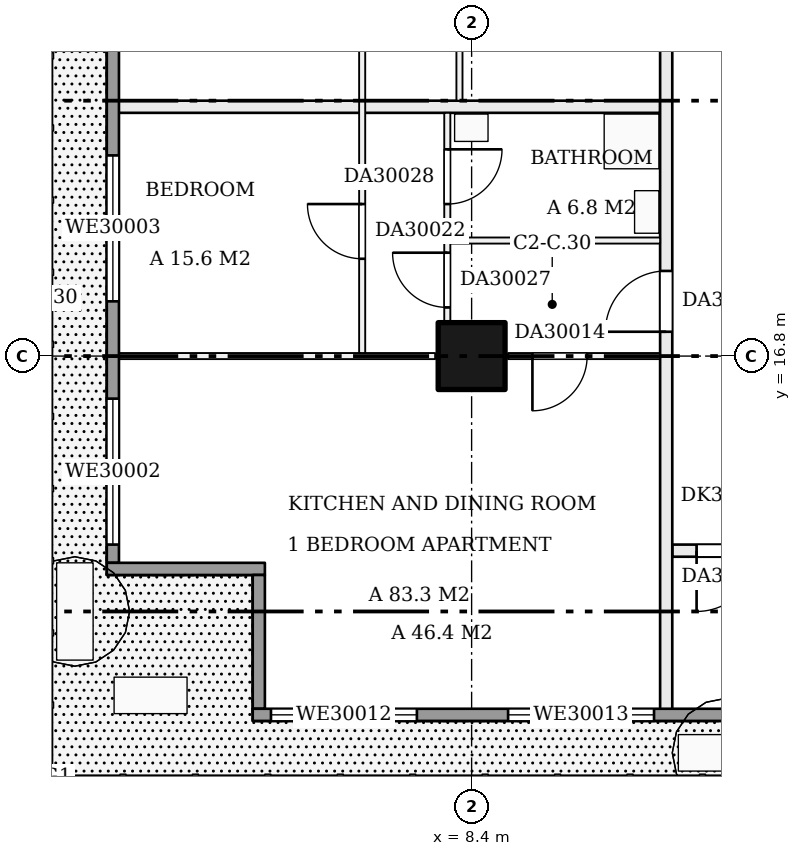
"""IFC4 building model, lengths in metres.
Left out: names, types, materials, properties, quantities, classifications, styles, units other than length and angle.
Written with IfcOpenShell. Run it as: python <this file> out.ifc"""

import sys

from ifc_helpers import new_model, si_unit, direction, frame, frame_2d, origin, origin_2d, place, context, subcontext, project, spatial, rectangle, extrude, element, fill, save


model = new_model("IFC4")
c1 = context("Model", 3, precision=1e-05, world=origin(), true_north=direction((0.0, 1.0)))
c2 = subcontext(c1, "Body", "Model", "MODEL_VIEW")
j1 = project(units=[si_unit("LENGTHUNIT", "METRE"), si_unit("PLANEANGLEUNIT", "RADIAN")], contexts=[c1])
p1 = place(None, origin())
s1 = spatial("IfcSite", under=j1, at=p1, CompositionType="ELEMENT")
p2 = place(p1, origin())
s2 = spatial("IfcBuilding", under=s1, at=p2, CompositionType="ELEMENT")
p3 = place(p2, frame((0.0, 0.0, 119.7)))
s3 = spatial("IfcBuildingStorey", under=s2, at=p3, CompositionType="ELEMENT", Elevation=119.7)
p4 = place(p3, frame((8.4, 16.8, 0.0), z_axis=(0.0, 0.0, 1.0), x_axis=(1.0, 0.0, 0.0)))
e1 = element("IfcColumn", 1, at=p4, inside=s3, PredefinedType="COLUMN", context=c2, shape_type="SweptSolid", body=[
    extrude(rectangle(XDim=1.1, YDim=1.1, at=origin_2d()), origin(), (0.0, 0.0, 1.0), 3.22),
])
p5 = place(p3, frame((11.7, 13.6, 0.0), z_axis=(0.0, 0.0, 1.0), x_axis=(1.0, 0.0, 0.0)))
e2 = element("IfcWall", 2, at=p5, inside=s3, PredefinedType="PARTITIONING", context=c2, shape_type="SweptSolid", body=[
    extrude(rectangle(XDim=1.8, YDim=0.2, at=frame_2d((0.9, 0.0))), origin(), (0.0, 0.0, 1.0), 3.22),
])
p6 = place(p5, frame((0.4, 0.0, 0.0)))
e3 = element("IfcOpeningElement", 3, at=p6, cuts=e2, PredefinedType="OPENING", context=c2, shape_type="SweptSolid", body=[
    extrude(rectangle(XDim=1.0, YDim=2.1, at=frame_2d((0.5, 1.05))), frame((0.0, 0.11, 0.0), z_axis=(0.0, -1.0, 0.0), x_axis=(1.0, 0.0, 0.0)), (0.0, 0.0, 1.0), 0.22),
])
p7 = place(p3, frame((2.5, 16.8, 0.0), z_axis=(0.0, 0.0, 1.0), x_axis=(1.0, 0.0, 0.0)))
e4 = element("IfcWall", 4, at=p7, inside=s3, PredefinedType="PARTITIONING", context=c2, shape_type="SweptSolid", body=[
    extrude(rectangle(XDim=5.3, YDim=0.1, at=frame_2d((2.65, 0.0))), origin(), (0.0, 0.0, 1.0), 3.22),
])
p8 = place(p3, frame((9.0, 16.8, 0.0), z_axis=(0.0, 0.0, 1.0), x_axis=(1.0, 0.0, 0.0)))
e5 = element("IfcWall", 5, at=p8, inside=s3, PredefinedType="PARTITIONING", context=c2, shape_type="SweptSolid", body=[
    extrude(rectangle(XDim=2.5, YDim=0.1, at=frame_2d((1.25, 0.0))), origin(), (0.0, 0.0, 1.0), 3.22),
])
p9 = place(p8, frame((0.4, 0.0, 0.0)))
e6 = element("IfcOpeningElement", 6, at=p9, cuts=e5, PredefinedType="OPENING", context=c2, shape_type="SweptSolid", body=[
    extrude(rectangle(XDim=0.9, YDim=2.1, at=frame_2d((0.45, 1.05))), frame((0.0, 0.06, 0.0), z_axis=(0.0, -1.0, 0.0), x_axis=(1.0, 0.0, 0.0)), (0.0, 0.0, 1.0), 0.12),
])
p10 = place(p3, frame((8.05, 18.7, 0.0), z_axis=(0.0, 0.0, 1.0), x_axis=(1.0, 0.0, 0.0)))
e7 = element("IfcWall", 7, at=p10, inside=s3, PredefinedType="PARTITIONING", context=c2, shape_type="SweptSolid", body=[
    extrude(rectangle(XDim=3.45, YDim=0.1, at=frame_2d((1.725, 0.0))), origin(), (0.0, 0.0, 1.0), 3.22),
])
p11 = place(p3, frame((2.5, 20.9, 0.0), z_axis=(0.0, 0.0, 1.0), x_axis=(1.0, 0.0, 0.0)))
e8 = element("IfcWall", 8, at=p11, inside=s3, PredefinedType="PARTITIONING", context=c2, shape_type="SweptSolid", body=[
    extrude(rectangle(XDim=9.0, YDim=0.2, at=frame_2d((4.5, 0.0))), origin(), (0.0, 0.0, 1.0), 3.22),
])
p12 = place(p3, frame((6.6, 16.85, 0.0), z_axis=(0.0, 0.0, 1.0), x_axis=(0.0, 1.0, 0.0)))
e9 = element("IfcWall", 9, at=p12, inside=s3, PredefinedType="PARTITIONING", context=c2, shape_type="SweptSolid", body=[
    extrude(rectangle(XDim=25.05, YDim=0.1, at=frame_2d((12.525, 0.0))), origin(), (0.0, 0.0, 1.0), 3.22),
])
p13 = place(p12, frame((1.55, 0.0, 0.0)))
e10 = element("IfcOpeningElement", 10, at=p13, cuts=e9, PredefinedType="OPENING", context=c2, shape_type="SweptSolid", body=[
    extrude(rectangle(XDim=0.9, YDim=2.1, at=frame_2d((0.45, 1.05))), frame((0.0, 0.06, 0.0), z_axis=(0.0, -1.0, 0.0), x_axis=(1.0, 0.0, 0.0)), (0.0, 0.0, 1.0), 0.12),
])
p14 = place(p12, frame((7.15, 0.0, 0.0)))
e11 = element("IfcOpeningElement", 11, at=p14, cuts=e9, PredefinedType="OPENING", context=c2, shape_type="SweptSolid", body=[
    extrude(rectangle(XDim=0.9, YDim=2.1, at=frame_2d((0.45, 1.05))), frame((0.0, 0.06, 0.0), z_axis=(0.0, -1.0, 0.0), x_axis=(1.0, 0.0, 0.0)), (0.0, 0.0, 1.0), 0.12),
])
p15 = place(p12, frame((14.15, 0.0, 0.0)))
e12 = element("IfcOpeningElement", 12, at=p15, cuts=e9, PredefinedType="OPENING", context=c2, shape_type="SweptSolid", body=[
    extrude(rectangle(XDim=0.9, YDim=2.1, at=frame_2d((0.45, 1.05))), frame((0.0, 0.06, 0.0), z_axis=(0.0, -1.0, 0.0), x_axis=(1.0, 0.0, 0.0)), (0.0, 0.0, 1.0), 0.12),
])
p16 = place(p12, frame((18.35, 0.0, 0.0)))
e13 = element("IfcOpeningElement", 13, at=p16, cuts=e9, PredefinedType="OPENING", context=c2, shape_type="SweptSolid", body=[
    extrude(rectangle(XDim=0.9, YDim=2.1, at=frame_2d((0.45, 1.05))), frame((0.0, 0.06, 0.0), z_axis=(0.0, -1.0, 0.0), x_axis=(1.0, 0.0, 0.0)), (0.0, 0.0, 1.0), 0.12),
])
p17 = place(p12, frame((22.55, 0.0, 0.0)))
e14 = element("IfcOpeningElement", 14, at=p17, cuts=e9, PredefinedType="OPENING", context=c2, shape_type="SweptSolid", body=[
    extrude(rectangle(XDim=0.9, YDim=2.1, at=frame_2d((0.45, 1.05))), frame((0.0, 0.06, 0.0), z_axis=(0.0, -1.0, 0.0), x_axis=(1.0, 0.0, 0.0)), (0.0, 0.0, 1.0), 0.12),
])
p18 = place(p3, frame((8.0, 16.85, 0.0), z_axis=(0.0, 0.0, 1.0), x_axis=(0.0, 1.0, 0.0)))
e15 = element("IfcWall", 15, at=p18, inside=s3, PredefinedType="PARTITIONING", context=c2, shape_type="SweptSolid", body=[
    extrude(rectangle(XDim=3.95, YDim=0.1, at=frame_2d((1.975, 0.0))), origin(), (0.0, 0.0, 1.0), 3.22),
])
p19 = place(p18, frame((0.75, 0.0, 0.0)))
e16 = element("IfcOpeningElement", 16, at=p19, cuts=e15, PredefinedType="OPENING", context=c2, shape_type="SweptSolid", body=[
    extrude(rectangle(XDim=0.9, YDim=2.1, at=frame_2d((0.45, 1.05))), frame((0.0, 0.06, 0.0), z_axis=(0.0, -1.0, 0.0), x_axis=(1.0, 0.0, 0.0)), (0.0, 0.0, 1.0), 0.12),
])
p20 = place(p18, frame((2.45, 0.0, 0.0)))
e17 = element("IfcOpeningElement", 17, at=p20, cuts=e15, PredefinedType="OPENING", context=c2, shape_type="SweptSolid", body=[
    extrude(rectangle(XDim=0.9, YDim=2.1, at=frame_2d((0.45, 1.05))), frame((0.0, 0.06, 0.0), z_axis=(0.0, -1.0, 0.0), x_axis=(1.0, 0.0, 0.0)), (0.0, 0.0, 1.0), 0.12),
])
p21 = place(p3, frame((8.2, 21.0, 0.0), z_axis=(0.0, 0.0, 1.0), x_axis=(0.0, 1.0, 0.0)))
e18 = element("IfcWall", 18, at=p21, inside=s3, PredefinedType="PARTITIONING", context=c2, shape_type="SweptSolid", body=[
    extrude(rectangle(XDim=20.9, YDim=0.1, at=frame_2d((10.45, 0.0))), origin(), (0.0, 0.0, 1.0), 3.22),
])
p22 = place(p21, frame((1.0, 0.0, 0.0)))
e19 = element("IfcOpeningElement", 19, at=p22, cuts=e18, PredefinedType="OPENING", context=c2, shape_type="SweptSolid", body=[
    extrude(rectangle(XDim=0.9, YDim=2.1, at=frame_2d((0.45, 1.05))), frame((0.0, 0.06, 0.0), z_axis=(0.0, -1.0, 0.0), x_axis=(1.0, 0.0, 0.0)), (0.0, 0.0, 1.0), 0.12),
])
p23 = place(p21, frame((4.914, 0.0, 0.0)))
e20 = element("IfcOpeningElement", 20, at=p23, cuts=e18, PredefinedType="OPENING", context=c2, shape_type="SweptSolid", body=[
    extrude(rectangle(XDim=0.9, YDim=2.1, at=frame_2d((0.45, 1.05))), frame((0.0, 0.06, 0.0), z_axis=(0.0, -1.0, 0.0), x_axis=(1.0, 0.0, 0.0)), (0.0, 0.0, 1.0), 0.12),
])
p24 = place(p21, frame((7.329, 0.0, 0.0)))
e21 = element("IfcOpeningElement", 21, at=p24, cuts=e18, PredefinedType="OPENING", context=c2, shape_type="SweptSolid", body=[
    extrude(rectangle(XDim=0.9, YDim=2.1, at=frame_2d((0.45, 1.05))), frame((0.0, 0.06, 0.0), z_axis=(0.0, -1.0, 0.0), x_axis=(1.0, 0.0, 0.0)), (0.0, 0.0, 1.0), 0.12),
])
p25 = place(p21, frame((10.243, 0.0, 0.0)))
e22 = element("IfcOpeningElement", 22, at=p25, cuts=e18, PredefinedType="OPENING", context=c2, shape_type="SweptSolid", body=[
    extrude(rectangle(XDim=0.9, YDim=2.1, at=frame_2d((0.45, 1.05))), frame((0.0, 0.06, 0.0), z_axis=(0.0, -1.0, 0.0), x_axis=(1.0, 0.0, 0.0)), (0.0, 0.0, 1.0), 0.12),
])
p26 = place(p21, frame((13.357, 0.0, 0.0)))
e23 = element("IfcOpeningElement", 23, at=p26, cuts=e18, PredefinedType="OPENING", context=c2, shape_type="SweptSolid", body=[
    extrude(rectangle(XDim=0.9, YDim=2.1, at=frame_2d((0.45, 1.05))), frame((0.0, 0.06, 0.0), z_axis=(0.0, -1.0, 0.0), x_axis=(1.0, 0.0, 0.0)), (0.0, 0.0, 1.0), 0.12),
])
p27 = place(p21, frame((15.772, 0.0, 0.0)))
e24 = element("IfcOpeningElement", 24, at=p27, cuts=e18, PredefinedType="OPENING", context=c2, shape_type="SweptSolid", body=[
    extrude(rectangle(XDim=0.9, YDim=2.1, at=frame_2d((0.45, 1.05))), frame((0.0, 0.06, 0.0), z_axis=(0.0, -1.0, 0.0), x_axis=(1.0, 0.0, 0.0)), (0.0, 0.0, 1.0), 0.12),
])
p28 = place(p21, frame((18.986, 0.0, 0.0)))
e25 = element("IfcOpeningElement", 25, at=p28, cuts=e18, PredefinedType="OPENING", context=c2, shape_type="SweptSolid", body=[
    extrude(rectangle(XDim=0.9, YDim=2.1, at=frame_2d((0.45, 1.05))), frame((0.0, 0.06, 0.0), z_axis=(0.0, -1.0, 0.0), x_axis=(1.0, 0.0, 0.0)), (0.0, 0.0, 1.0), 0.12),
])
p29 = place(p3, frame((11.6, 10.9, 0.0), z_axis=(0.0, 0.0, 1.0), x_axis=(0.0, 1.0, 0.0)))
e26 = element("IfcWall", 26, at=p29, inside=s3, PredefinedType="PARTITIONING", context=c2, shape_type="SweptSolid", body=[
    extrude(rectangle(XDim=31.1, YDim=0.2, at=frame_2d((15.55, 0.0))), origin(), (0.0, 0.0, 1.0), 3.22),
])
p30 = place(p29, frame((6.3, 0.0, 0.0)))
e27 = element("IfcOpeningElement", 27, at=p30, cuts=e26, PredefinedType="OPENING", context=c2, shape_type="SweptSolid", body=[
    extrude(rectangle(XDim=1.0, YDim=2.1, at=frame_2d((0.5, 1.05))), frame((0.0, 0.11, 0.0), z_axis=(0.0, -1.0, 0.0), x_axis=(1.0, 0.0, 0.0)), (0.0, 0.0, 1.0), 0.22),
])
p31 = place(p29, frame((11.0, 0.0, 0.0)))
e28 = element("IfcOpeningElement", 28, at=p31, cuts=e26, PredefinedType="OPENING", context=c2, shape_type="SweptSolid", body=[
    extrude(rectangle(XDim=1.0, YDim=2.1, at=frame_2d((0.5, 1.05))), frame((0.0, 0.11, 0.0), z_axis=(0.0, -1.0, 0.0), x_axis=(1.0, 0.0, 0.0)), (0.0, 0.0, 1.0), 0.22),
])
p32 = place(p3, frame((2.5, 53.8, 0.0), z_axis=(0.0, 0.0, 1.0), x_axis=(0.0, -1.0, 0.0)))
e29 = element("IfcWall", 29, at=p32, inside=s3, PredefinedType="SOLIDWALL", context=c2, shape_type="SweptSolid", body=[
    extrude(rectangle(XDim=40.4, YDim=0.2, at=frame_2d((20.2, 0.0))), origin(), (0.0, 0.0, 1.0), 3.22),
])
p33 = place(p32, frame((37.7, 0.0, 0.9)))
e30 = element("IfcOpeningElement", 30, at=p33, cuts=e29, PredefinedType="OPENING", context=c2, shape_type="SweptSolid", body=[
    extrude(rectangle(XDim=2.4, YDim=1.5, at=frame_2d((1.2, 0.75))), frame((0.0, 0.11, 0.0), z_axis=(0.0, -1.0, 0.0), x_axis=(1.0, 0.0, 0.0)), (0.0, 0.0, 1.0), 0.22),
])
p34 = place(p32, frame((33.7, 0.0, 0.9)))
e31 = element("IfcOpeningElement", 31, at=p34, cuts=e29, PredefinedType="OPENING", context=c2, shape_type="SweptSolid", body=[
    extrude(rectangle(XDim=2.4, YDim=1.5, at=frame_2d((1.2, 0.75))), frame((0.0, 0.11, 0.0), z_axis=(0.0, -1.0, 0.0), x_axis=(1.0, 0.0, 0.0)), (0.0, 0.0, 1.0), 0.22),
])
p35 = place(p32, frame((29.5, 0.0, 0.0)))
e32 = element("IfcOpeningElement", 32, at=p35, cuts=e29, PredefinedType="OPENING", context=c2, shape_type="SweptSolid", body=[
    extrude(rectangle(XDim=2.4, YDim=2.2, at=frame_2d((1.2, 1.1))), frame((0.0, 0.11, 0.0), z_axis=(0.0, -1.0, 0.0), x_axis=(1.0, 0.0, 0.0)), (0.0, 0.0, 1.0), 0.22),
])
p36 = place(p32, frame((25.3, 0.0, 0.0)))
e33 = element("IfcOpeningElement", 33, at=p36, cuts=e29, PredefinedType="OPENING", context=c2, shape_type="SweptSolid", body=[
    extrude(rectangle(XDim=2.4, YDim=2.2, at=frame_2d((1.2, 1.1))), frame((0.0, 0.11, 0.0), z_axis=(0.0, -1.0, 0.0), x_axis=(1.0, 0.0, 0.0)), (0.0, 0.0, 1.0), 0.22),
])
p37 = place(p32, frame((21.1, 0.0, 0.9)))
e34 = element("IfcOpeningElement", 34, at=p37, cuts=e29, PredefinedType="OPENING", context=c2, shape_type="SweptSolid", body=[
    extrude(rectangle(XDim=2.4, YDim=1.5, at=frame_2d((1.2, 0.75))), frame((0.0, 0.11, 0.0), z_axis=(0.0, -1.0, 0.0), x_axis=(1.0, 0.0, 0.0)), (0.0, 0.0, 1.0), 0.22),
])
p38 = place(p32, frame((16.9, 0.0, 0.9)))
e35 = element("IfcOpeningElement", 35, at=p38, cuts=e29, PredefinedType="OPENING", context=c2, shape_type="SweptSolid", body=[
    extrude(rectangle(XDim=2.4, YDim=1.5, at=frame_2d((1.2, 0.75))), frame((0.0, 0.11, 0.0), z_axis=(0.0, -1.0, 0.0), x_axis=(1.0, 0.0, 0.0)), (0.0, 0.0, 1.0), 0.22),
])
p39 = place(p32, frame((12.7, 0.0, 0.9)))
e36 = element("IfcOpeningElement", 36, at=p39, cuts=e29, PredefinedType="OPENING", context=c2, shape_type="SweptSolid", body=[
    extrude(rectangle(XDim=2.4, YDim=1.5, at=frame_2d((1.2, 0.75))), frame((0.0, 0.11, 0.0), z_axis=(0.0, -1.0, 0.0), x_axis=(1.0, 0.0, 0.0)), (0.0, 0.0, 1.0), 0.22),
])
p40 = place(p32, frame((8.5, 0.0, 0.9)))
e37 = element("IfcOpeningElement", 37, at=p40, cuts=e29, PredefinedType="OPENING", context=c2, shape_type="SweptSolid", body=[
    extrude(rectangle(XDim=2.4, YDim=1.5, at=frame_2d((1.2, 0.75))), frame((0.0, 0.11, 0.0), z_axis=(0.0, -1.0, 0.0), x_axis=(1.0, 0.0, 0.0)), (0.0, 0.0, 1.0), 0.22),
])
p41 = place(p32, frame((4.3, 0.0, 0.9)))
e38 = element("IfcOpeningElement", 38, at=p41, cuts=e29, PredefinedType="OPENING", context=c2, shape_type="SweptSolid", body=[
    extrude(rectangle(XDim=2.4, YDim=1.5, at=frame_2d((1.2, 0.75))), frame((0.0, 0.11, 0.0), z_axis=(0.0, -1.0, 0.0), x_axis=(1.0, 0.0, 0.0)), (0.0, 0.0, 1.0), 0.22),
])
p42 = place(p32, frame((0.3, 0.0, 0.0)))
e39 = element("IfcOpeningElement", 39, at=p42, cuts=e29, PredefinedType="OPENING", context=c2, shape_type="SweptSolid", body=[
    extrude(rectangle(XDim=2.4, YDim=2.2, at=frame_2d((1.2, 1.1))), frame((0.0, 0.11, 0.0), z_axis=(0.0, -1.0, 0.0), x_axis=(1.0, 0.0, 0.0)), (0.0, 0.0, 1.0), 0.22),
])
p43 = place(p3, frame((2.4, 13.3, 0.0), z_axis=(0.0, 0.0, 1.0), x_axis=(1.0, 0.0, 0.0)))
e40 = element("IfcWall", 40, at=p43, inside=s3, PredefinedType="SOLIDWALL", context=c2, shape_type="SweptSolid", body=[
    extrude(rectangle(XDim=2.6, YDim=0.2, at=frame_2d((1.3, 0.0))), origin(), (0.0, 0.0, 1.0), 3.22),
])
p44 = place(p3, frame((4.9, 13.2, 0.0), z_axis=(0.0, 0.0, 1.0), x_axis=(0.0, -1.0, 0.0)))
e41 = element("IfcWall", 41, at=p44, inside=s3, PredefinedType="SOLIDWALL", context=c2, shape_type="SweptSolid", body=[
    extrude(rectangle(XDim=2.2, YDim=0.2, at=frame_2d((1.1, 0.0))), origin(), (0.0, 0.0, 1.0), 3.22),
])
p45 = place(p3, frame((4.8, 10.9, 0.0), z_axis=(0.0, 0.0, 1.0), x_axis=(1.0, 0.0, 0.0)))
e42 = element("IfcWall", 42, at=p45, inside=s3, PredefinedType="SOLIDWALL", context=c2, shape_type="SweptSolid", body=[
    extrude(rectangle(XDim=37.2, YDim=0.2, at=frame_2d((18.6, 0.0))), origin(), (0.0, 0.0, 1.0), 3.22),
])
p46 = place(p45, frame((0.3, 0.0, 0.9)))
e43 = element("IfcOpeningElement", 43, at=p46, cuts=e42, PredefinedType="OPENING", context=c2, shape_type="SweptSolid", body=[
    extrude(rectangle(XDim=2.4, YDim=1.5, at=frame_2d((1.2, 0.75))), frame((0.0, 0.11, 0.0), z_axis=(0.0, -1.0, 0.0), x_axis=(1.0, 0.0, 0.0)), (0.0, 0.0, 1.0), 0.22),
])
p47 = place(p45, frame((4.2, 0.0, 0.9)))
e44 = element("IfcOpeningElement", 44, at=p47, cuts=e42, PredefinedType="OPENING", context=c2, shape_type="SweptSolid", body=[
    extrude(rectangle(XDim=2.4, YDim=1.5, at=frame_2d((1.2, 0.75))), frame((0.0, 0.11, 0.0), z_axis=(0.0, -1.0, 0.0), x_axis=(1.0, 0.0, 0.0)), (0.0, 0.0, 1.0), 0.22),
])
p48 = place(p45, frame((12.9, 0.0, 0.9)))
e45 = element("IfcOpeningElement", 45, at=p48, cuts=e42, PredefinedType="OPENING", context=c2, shape_type="SweptSolid", body=[
    extrude(rectangle(XDim=2.4, YDim=1.5, at=frame_2d((1.2, 0.75))), frame((0.0, 0.11, 0.0), z_axis=(0.0, -1.0, 0.0), x_axis=(1.0, 0.0, 0.0)), (0.0, 0.0, 1.0), 0.22),
])
p49 = place(p45, frame((17.1, 0.0, 0.9)))
e46 = element("IfcOpeningElement", 46, at=p49, cuts=e42, PredefinedType="OPENING", context=c2, shape_type="SweptSolid", body=[
    extrude(rectangle(XDim=2.4, YDim=1.5, at=frame_2d((1.2, 0.75))), frame((0.0, 0.11, 0.0), z_axis=(0.0, -1.0, 0.0), x_axis=(1.0, 0.0, 0.0)), (0.0, 0.0, 1.0), 0.22),
])
p50 = place(p45, frame((21.3, 0.0, 0.0)))
e47 = element("IfcOpeningElement", 47, at=p50, cuts=e42, PredefinedType="OPENING", context=c2, shape_type="SweptSolid", body=[
    extrude(rectangle(XDim=2.4, YDim=2.2, at=frame_2d((1.2, 1.1))), frame((0.0, 0.11, 0.0), z_axis=(0.0, -1.0, 0.0), x_axis=(1.0, 0.0, 0.0)), (0.0, 0.0, 1.0), 0.22),
])
p51 = place(p45, frame((25.5, 0.0, 0.9)))
e48 = element("IfcOpeningElement", 48, at=p51, cuts=e42, PredefinedType="OPENING", context=c2, shape_type="SweptSolid", body=[
    extrude(rectangle(XDim=2.4, YDim=1.5, at=frame_2d((1.2, 0.75))), frame((0.0, 0.11, 0.0), z_axis=(0.0, -1.0, 0.0), x_axis=(1.0, 0.0, 0.0)), (0.0, 0.0, 1.0), 0.22),
])
p52 = place(p45, frame((29.7, 0.0, 0.9)))
e49 = element("IfcOpeningElement", 49, at=p52, cuts=e42, PredefinedType="OPENING", context=c2, shape_type="SweptSolid", body=[
    extrude(rectangle(XDim=2.4, YDim=1.5, at=frame_2d((1.2, 0.75))), frame((0.0, 0.11, 0.0), z_axis=(0.0, -1.0, 0.0), x_axis=(1.0, 0.0, 0.0)), (0.0, 0.0, 1.0), 0.22),
])
p53 = place(p45, frame((33.9, 0.0, 0.9)))
e50 = element("IfcOpeningElement", 50, at=p53, cuts=e42, PredefinedType="OPENING", context=c2, shape_type="SweptSolid", body=[
    extrude(rectangle(XDim=1.3, YDim=1.5, at=frame_2d((0.65, 0.75))), frame((0.0, 0.11, 0.0), z_axis=(0.0, -1.0, 0.0), x_axis=(1.0, 0.0, 0.0)), (0.0, 0.0, 1.0), 0.22),
])
p54 = place(p6, frame((1.0, 0.0, 0.0), z_axis=(0.0, 0.0, 1.0), x_axis=(-1.0, 0.0, 0.0)))
e51 = element("IfcDoor", 51, at=p54, inside=s3, OperationType="SINGLE_SWING_RIGHT", PredefinedType="DOOR", context=c2, shape_type="SweptSolid", body=[
    extrude(rectangle(XDim=1.0, YDim=2.1, at=frame_2d((0.5, 1.05))), frame((0.0, 0.025, 0.0), z_axis=(0.0, -1.0, 0.0), x_axis=(1.0, 0.0, 0.0)), (0.0, 0.0, 1.0), 0.05),
])
fill(e3, e51)
p55 = place(p9, frame((0.9, 0.0, 0.0), z_axis=(0.0, 0.0, 1.0), x_axis=(-1.0, 0.0, 0.0)))
e52 = element("IfcDoor", 52, at=p55, inside=s3, OperationType="SINGLE_SWING_RIGHT", PredefinedType="DOOR", context=c2, shape_type="SweptSolid", body=[
    extrude(rectangle(XDim=0.9, YDim=2.1, at=frame_2d((0.45, 1.05))), frame((0.0, 0.025, 0.0), z_axis=(0.0, -1.0, 0.0), x_axis=(1.0, 0.0, 0.0)), (0.0, 0.0, 1.0), 0.05),
])
fill(e6, e52)
p56 = place(p13, origin())
e53 = element("IfcDoor", 53, at=p56, inside=s3, OperationType="SINGLE_SWING_RIGHT", PredefinedType="DOOR", context=c2, shape_type="SweptSolid", body=[
    extrude(rectangle(XDim=0.9, YDim=2.1, at=frame_2d((0.45, 1.05))), frame((0.0, 0.025, 0.0), z_axis=(0.0, -1.0, 0.0), x_axis=(1.0, 0.0, 0.0)), (0.0, 0.0, 1.0), 0.05),
])
fill(e10, e53)
p57 = place(p19, origin())
e54 = element("IfcDoor", 54, at=p57, inside=s3, OperationType="SINGLE_SWING_RIGHT", PredefinedType="DOOR", context=c2, shape_type="SweptSolid", body=[
    extrude(rectangle(XDim=0.9, YDim=2.1, at=frame_2d((0.45, 1.05))), frame((0.0, 0.025, 0.0), z_axis=(0.0, -1.0, 0.0), x_axis=(1.0, 0.0, 0.0)), (0.0, 0.0, 1.0), 0.05),
])
fill(e16, e54)
p58 = place(p20, frame((0.9, 0.0, 0.0), z_axis=(0.0, 0.0, 1.0), x_axis=(-1.0, 0.0, 0.0)))
e55 = element("IfcDoor", 55, at=p58, inside=s3, OperationType="SINGLE_SWING_LEFT", PredefinedType="DOOR", context=c2, shape_type="SweptSolid", body=[
    extrude(rectangle(XDim=0.9, YDim=2.1, at=frame_2d((0.45, 1.05))), frame((0.0, 0.025, 0.0), z_axis=(0.0, -1.0, 0.0), x_axis=(1.0, 0.0, 0.0)), (0.0, 0.0, 1.0), 0.05),
])
fill(e17, e55)
p59 = place(p30, origin())
e56 = element("IfcDoor", 56, at=p59, inside=s3, OperationType="SINGLE_SWING_LEFT", PredefinedType="DOOR", context=c2, shape_type="SweptSolid", body=[
    extrude(rectangle(XDim=1.0, YDim=2.1, at=frame_2d((0.5, 1.05))), frame((0.0, 0.025, 0.0), z_axis=(0.0, -1.0, 0.0), x_axis=(1.0, 0.0, 0.0)), (0.0, 0.0, 1.0), 0.05),
])
fill(e27, e56)
p60 = place(p33, origin())
e57 = element("IfcWindow", 57, at=p60, inside=s3, PartitioningType="SINGLE_PANEL", PredefinedType="WINDOW", context=c2, shape_type="SweptSolid", body=[
    extrude(rectangle(XDim=2.4, YDim=1.5, at=frame_2d((1.2, 0.75))), frame((0.0, 0.03, 0.0), z_axis=(0.0, -1.0, 0.0), x_axis=(1.0, 0.0, 0.0)), (0.0, 0.0, 1.0), 0.06),
])
fill(e30, e57)
p61 = place(p34, origin())
e58 = element("IfcWindow", 58, at=p61, inside=s3, PartitioningType="SINGLE_PANEL", PredefinedType="WINDOW", context=c2, shape_type="SweptSolid", body=[
    extrude(rectangle(XDim=2.4, YDim=1.5, at=frame_2d((1.2, 0.75))), frame((0.0, 0.03, 0.0), z_axis=(0.0, -1.0, 0.0), x_axis=(1.0, 0.0, 0.0)), (0.0, 0.0, 1.0), 0.06),
])
fill(e31, e58)
p62 = place(p46, origin())
e59 = element("IfcWindow", 59, at=p62, inside=s3, PartitioningType="SINGLE_PANEL", PredefinedType="WINDOW", context=c2, shape_type="SweptSolid", body=[
    extrude(rectangle(XDim=2.4, YDim=1.5, at=frame_2d((1.2, 0.75))), frame((0.0, 0.03, 0.0), z_axis=(0.0, -1.0, 0.0), x_axis=(1.0, 0.0, 0.0)), (0.0, 0.0, 1.0), 0.06),
])
fill(e43, e59)
p63 = place(p47, origin())
e60 = element("IfcWindow", 60, at=p63, inside=s3, PartitioningType="SINGLE_PANEL", PredefinedType="WINDOW", context=c2, shape_type="SweptSolid", body=[
    extrude(rectangle(XDim=2.4, YDim=1.5, at=frame_2d((1.2, 0.75))), frame((0.0, 0.03, 0.0), z_axis=(0.0, -1.0, 0.0), x_axis=(1.0, 0.0, 0.0)), (0.0, 0.0, 1.0), 0.06),
])
fill(e44, e60)
save(model, sys.argv[1])
